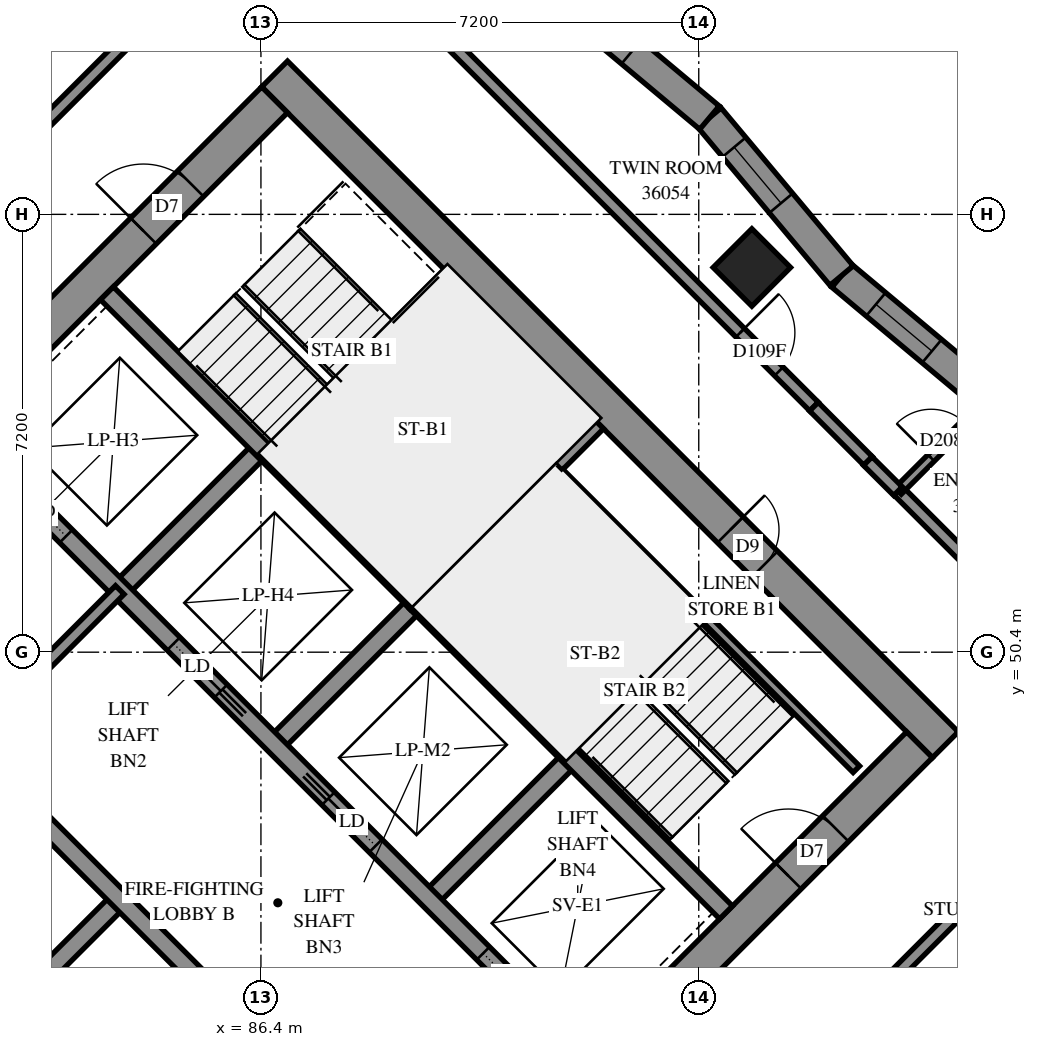
"""IFC4 building model, lengths in metres.
Left out: names, types, materials, properties, quantities, classifications, styles, units other than length and angle.
Written with IfcOpenShell. Run it as: python <this file> out.ifc"""

import sys

from ifc_helpers import new_model, si_unit, direction, frame, frame_2d, origin, origin_2d, place, context, subcontext, project, spatial, polyline, rectangle, outline, extrude, element, fill, save


model = new_model("IFC4")
c1 = context("Model", 3, precision=1e-05, world=origin(), true_north=direction((0.0, 1.0)))
c2 = subcontext(c1, "Body", "Model", "MODEL_VIEW")
j1 = project(units=[si_unit("LENGTHUNIT", "METRE"), si_unit("PLANEANGLEUNIT", "RADIAN")], contexts=[c1])
p1 = place(None, origin())
s1 = spatial("IfcSite", under=j1, at=p1, CompositionType="ELEMENT")
p2 = place(p1, origin())
s2 = spatial("IfcBuilding", under=s1, at=p2, CompositionType="ELEMENT")
p3 = place(p2, frame((0.0, 0.0, 135.4)))
s3 = spatial("IfcBuildingStorey", under=s2, at=p3, CompositionType="ELEMENT", Elevation=135.4)
p4 = place(p3, frame((94.474, 56.727, 0.0), z_axis=(0.0, 0.0, 1.0), x_axis=(0.7071067812, -0.7071067812, 0.0)))
e1 = element("IfcColumn", 1, at=p4, inside=s3, PredefinedType="COLUMN", context=c2, shape_type="SweptSolid", body=[
    extrude(rectangle(XDim=0.9, YDim=0.9, at=origin_2d()), origin(), (0.0, 0.0, 1.0), 3.1),
])
p5 = place(p3, frame((76.018, 49.302, -0.3), z_axis=(0.0, 0.0, 1.0), x_axis=(0.7071067812, -0.7071067812, 0.0)))
e2 = element("IfcWall", 2, at=p5, inside=s3, PredefinedType="SHEAR", context=c2, shape_type="SweptSolid", body=[
    extrude(rectangle(XDim=15.6, YDim=0.6, at=frame_2d((7.8, 0.0))), origin(), (0.0, 0.0, 1.0), 2.7),
])
p6 = place(p3, frame((86.625, 59.908, -0.3), z_axis=(0.0, 0.0, 1.0), x_axis=(0.7071067812, -0.7071067812, 0.0)))
e3 = element("IfcWall", 3, at=p6, inside=s3, PredefinedType="SHEAR", context=c2, shape_type="SweptSolid", body=[
    extrude(rectangle(XDim=15.6, YDim=0.6, at=frame_2d((7.8, 0.0))), origin(), (0.0, 0.0, 1.0), 2.7),
])
p7 = place(p6, frame((10.6, 0.0, 0.3)))
e4 = element("IfcOpeningElement", 4, at=p7, cuts=e3, PredefinedType="OPENING", context=c2, shape_type="SweptSolid", body=[
    extrude(rectangle(XDim=0.8, YDim=2.1, at=frame_2d((0.4, 1.05))), frame((0.0, 0.31, 0.0), z_axis=(0.0, -1.0, 0.0), x_axis=(1.0, 0.0, 0.0)), (0.0, 0.0, 1.0), 0.62),
])
p8 = place(p3, frame((76.442, 49.302, -0.3), z_axis=(0.0, 0.0, 1.0), x_axis=(0.7071067812, 0.7071067812, 0.0)))
e5 = element("IfcWall", 5, at=p8, inside=s3, PredefinedType="SHEAR", context=c2, shape_type="SweptSolid", body=[
    extrude(rectangle(XDim=14.4, YDim=0.6, at=frame_2d((7.2, 0.0))), origin(), (0.0, 0.0, 1.0), 2.7),
])
p9 = place(p8, frame((4.55, 0.0, 0.3)))
e6 = element("IfcOpeningElement", 6, at=p9, cuts=e5, PredefinedType="OPENING", context=c2, shape_type="SweptSolid", body=[
    extrude(rectangle(XDim=1.1, YDim=2.1, at=frame_2d((0.55, 1.05))), frame((0.0, 0.31, 0.0), z_axis=(0.0, -1.0, 0.0), x_axis=(1.0, 0.0, 0.0)), (0.0, 0.0, 1.0), 0.62),
])
p10 = place(p8, frame((11.35, 0.0, 0.3)))
e7 = element("IfcOpeningElement", 7, at=p10, cuts=e5, PredefinedType="OPENING", context=c2, shape_type="SweptSolid", body=[
    extrude(rectangle(XDim=1.1, YDim=2.1, at=frame_2d((0.55, 1.05))), frame((0.0, 0.31, 0.0), z_axis=(0.0, -1.0, 0.0), x_axis=(1.0, 0.0, 0.0)), (0.0, 0.0, 1.0), 0.62),
])
p11 = place(p3, frame((87.049, 38.695, -0.3), z_axis=(0.0, 0.0, 1.0), x_axis=(0.7071067812, 0.7071067812, 0.0)))
e8 = element("IfcWall", 8, at=p11, inside=s3, PredefinedType="SHEAR", context=c2, shape_type="SweptSolid", body=[
    extrude(rectangle(XDim=14.4, YDim=0.6, at=frame_2d((7.2, 0.0))), origin(), (0.0, 0.0, 1.0), 2.7),
])
p12 = place(p11, frame((4.55, 0.0, 0.3)))
e9 = element("IfcOpeningElement", 9, at=p12, cuts=e8, PredefinedType="OPENING", context=c2, shape_type="SweptSolid", body=[
    extrude(rectangle(XDim=1.1, YDim=2.1, at=frame_2d((0.55, 1.05))), frame((0.0, 0.31, 0.0), z_axis=(0.0, -1.0, 0.0), x_axis=(1.0, 0.0, 0.0)), (0.0, 0.0, 1.0), 0.62),
])
p13 = place(p11, frame((11.35, 0.0, 0.3)))
e10 = element("IfcOpeningElement", 10, at=p13, cuts=e8, PredefinedType="OPENING", context=c2, shape_type="SweptSolid", body=[
    extrude(rectangle(XDim=1.1, YDim=2.1, at=frame_2d((0.55, 1.05))), frame((0.0, 0.31, 0.0), z_axis=(0.0, -1.0, 0.0), x_axis=(1.0, 0.0, 0.0)), (0.0, 0.0, 1.0), 0.62),
])
p14 = place(p3, frame((84.079, 51.423, 0.0), z_axis=(0.0, 0.0, 1.0), x_axis=(0.7071219326, 0.7070916295, 0.0)))
e11 = element("IfcWall", 11, at=p14, inside=s3, PredefinedType="SOLIDWALL", context=c2, shape_type="SweptSolid", body=[
    extrude(rectangle(XDim=3.3, YDim=0.3, at=frame_2d((1.65, 0.0))), origin(), (0.0, 0.0, 1.0), 3.1),
])
p15 = place(p3, frame((81.746, 43.999, 0.0), z_axis=(0.0, 0.0, 1.0), x_axis=(0.7071067812, 0.7071067812, 0.0)))
e12 = element("IfcWall", 12, at=p15, inside=s3, PredefinedType="SOLIDWALL", context=c2, shape_type="SweptSolid", body=[
    extrude(rectangle(XDim=3.3, YDim=0.3, at=frame_2d((1.65, 0.0))), origin(), (0.0, 0.0, 1.0), 3.1),
])
for number, where, z_axis, x_axis in (
    (13, (86.625, 48.878, 0.0), (0.0, 0.0, 1.0), (0.707, 0.707, 0.0)),
    (14, (89.17, 46.332, 0.0), (0.0, 0.0, 1.0), (0.707, 0.707, 0.0)),
):
    element("IfcWall", number, at=place(p3, frame(where, z_axis=z_axis, x_axis=x_axis)), inside=s3, PredefinedType="SOLIDWALL", context=c2, shape_type="SweptSolid", body=[
        extrude(rectangle(XDim=3.3, YDim=0.3, at=frame_2d((1.65, 0.0))), origin(), (0.0, 0.0, 1.0), 3.1),
    ])
p16 = place(p3, frame((78.988, 51.423, 0.0), z_axis=(0.0, 0.0, 1.0), x_axis=(0.7071067812, -0.7071067812, 0.0)))
e15 = element("IfcWall", 15, at=p16, inside=s3, PredefinedType="SOLIDWALL", context=c2, shape_type="SweptSolid", body=[
    extrude(rectangle(XDim=14.4, YDim=0.3, at=frame_2d((7.2, 0.0))), origin(), (0.0, 0.0, 1.0), 3.1),
])
p17 = place(p16, frame((12.05, 0.0, 0.0)))
e16 = element("IfcOpeningElement", 16, at=p17, cuts=e15, PredefinedType="OPENING", context=c2, shape_type="SweptSolid", body=[
    extrude(rectangle(XDim=1.1, YDim=2.1, at=frame_2d((0.55, 1.05))), frame((0.0, 0.16, 0.0), z_axis=(0.0, -1.0, 0.0), x_axis=(1.0, 0.0, 0.0)), (0.0, 0.0, 1.0), 0.32),
])
p18 = place(p3, frame((81.534, 53.969, 0.0), z_axis=(0.0, 0.0, 1.0), x_axis=(0.707103309, -0.7071102534, 0.0)))
e17 = element("IfcWall", 17, at=p18, inside=s3, PredefinedType="SOLIDWALL", context=c2, shape_type="SweptSolid", body=[
    extrude(rectangle(XDim=14.4, YDim=0.3, at=frame_2d((7.2, 0.0))), origin(), (0.0, 0.0, 1.0), 3.1),
])
p19 = place(p18, frame((1.25, 0.0, 0.0)))
e18 = element("IfcOpeningElement", 18, at=p19, cuts=e17, PredefinedType="OPENING", context=c2, shape_type="SweptSolid", body=[
    extrude(rectangle(XDim=1.1, YDim=2.1, at=frame_2d((0.55, 1.05))), frame((0.0, 0.16, 0.0), z_axis=(0.0, -1.0, 0.0), x_axis=(1.0, 0.0, 0.0)), (0.0, 0.0, 1.0), 0.32),
])
p20 = place(p18, frame((4.85, 0.0, 0.0)))
e19 = element("IfcOpeningElement", 19, at=p20, cuts=e17, PredefinedType="OPENING", context=c2, shape_type="SweptSolid", body=[
    extrude(rectangle(XDim=1.1, YDim=2.1, at=frame_2d((0.55, 1.05))), frame((0.0, 0.16, 0.0), z_axis=(0.0, -1.0, 0.0), x_axis=(1.0, 0.0, 0.0)), (0.0, 0.0, 1.0), 0.32),
])
p21 = place(p18, frame((8.45, 0.0, 0.0)))
e20 = element("IfcOpeningElement", 20, at=p21, cuts=e17, PredefinedType="OPENING", context=c2, shape_type="SweptSolid", body=[
    extrude(rectangle(XDim=1.1, YDim=2.1, at=frame_2d((0.55, 1.05))), frame((0.0, 0.16, 0.0), z_axis=(0.0, -1.0, 0.0), x_axis=(1.0, 0.0, 0.0)), (0.0, 0.0, 1.0), 0.32),
])
p22 = place(p18, frame((12.05, 0.0, 0.0)))
e21 = element("IfcOpeningElement", 21, at=p22, cuts=e17, PredefinedType="OPENING", context=c2, shape_type="SweptSolid", body=[
    extrude(rectangle(XDim=1.1, YDim=2.1, at=frame_2d((0.55, 1.05))), frame((0.0, 0.16, 0.0), z_axis=(0.0, -1.0, 0.0), x_axis=(1.0, 0.0, 0.0)), (0.0, 0.0, 1.0), 0.32),
])
for number, where, z_axis, x_axis in (
    (22, (83.867, 56.302, 0.0), (0.0, 0.0, 1.0), (0.707, -0.707, 0.0)),
    (23, (88.958, 51.211, 0.0), (0.0, 0.0, 1.0), (0.707, -0.707, 0.0)),
):
    element("IfcWall", number, at=place(p3, frame(where, z_axis=z_axis, x_axis=x_axis)), inside=s3, PredefinedType="SOLIDWALL", context=c2, shape_type="SweptSolid", body=[
        extrude(rectangle(XDim=7.2, YDim=0.3, at=frame_2d((3.6, 0.0))), origin(), (0.0, 0.0, 1.0), 3.1),
    ])
p23 = place(p3, frame((88.958, 51.211, 0.0), z_axis=(0.0, 0.0, 1.0), x_axis=(0.7071067812, 0.7071067812, 0.0)))
e24 = element("IfcWall", 24, at=p23, inside=s3, PredefinedType="SOLIDWALL", context=c2, shape_type="SweptSolid", body=[
    extrude(rectangle(XDim=4.2, YDim=0.3, at=frame_2d((2.1, 0.0))), origin(), (0.0, 0.0, 1.0), 3.1),
])
p24 = place(p3, frame((98.546, 54.421, 0.0), z_axis=(0.0, 0.0, 1.0), x_axis=(-0.7669706225, 0.6416822144, 0.0)))
e25 = element("IfcWall", 25, at=p24, inside=s3, PredefinedType="SOLIDWALL", context=c2, shape_type="SweptSolid", body=[
    extrude(outline(polyline([(-0.022, -0.25), (3.364, -0.25), (3.408, 0.25), (0.022, 0.25), (-0.022, -0.25)])), origin(), (0.0, 0.0, 1.0), 3.1),
])
p25 = place(p24, frame((1.45, 0.0, 0.45)))
e26 = element("IfcOpeningElement", 26, at=p25, cuts=e25, PredefinedType="OPENING", context=c2, shape_type="SweptSolid", body=[
    extrude(rectangle(XDim=1.2, YDim=2.5, at=frame_2d((0.6, 1.25))), frame((0.0, 0.26, 0.0), z_axis=(0.0, -1.0, 0.0), x_axis=(1.0, 0.0, 0.0)), (0.0, 0.0, 1.0), 0.52),
])
p26 = place(p3, frame((95.949, 56.593, 0.0), z_axis=(0.0, 0.0, 1.0), x_axis=(-0.6416822144, 0.7669706225, 0.0)))
e27 = element("IfcWall", 27, at=p26, inside=s3, PredefinedType="SOLIDWALL", context=c2, shape_type="SweptSolid", body=[
    extrude(outline(polyline([(0.022, -0.25), (3.408, -0.25), (3.364, 0.25), (-0.022, 0.25), (0.022, -0.25)])), origin(), (0.0, 0.0, 1.0), 3.1),
])
p27 = place(p26, frame((1.553, 0.0, 0.45)))
e28 = element("IfcOpeningElement", 28, at=p27, cuts=e27, PredefinedType="OPENING", context=c2, shape_type="SweptSolid", body=[
    extrude(rectangle(XDim=1.2, YDim=2.5, at=frame_2d((0.6, 1.25))), frame((0.0, 0.26, 0.0), z_axis=(0.0, -1.0, 0.0), x_axis=(1.0, 0.0, 0.0)), (0.0, 0.0, 1.0), 0.52),
])
p28 = place(p3, frame((93.776, 59.19, 0.0), z_axis=(0.0, 0.0, 1.0), x_axis=(-0.7669706225, 0.6416822144, 0.0)))
e29 = element("IfcWall", 29, at=p28, inside=s3, PredefinedType="SOLIDWALL", context=c2, shape_type="SweptSolid", body=[
    extrude(outline(polyline([(-0.022, -0.25), (3.364, -0.25), (3.408, 0.25), (0.022, 0.25), (-0.022, -0.25)])), origin(), (0.0, 0.0, 1.0), 3.1),
])
p29 = place(p28, frame((1.678, 0.0, 0.45)))
e30 = element("IfcOpeningElement", 30, at=p29, cuts=e29, PredefinedType="OPENING", context=c2, shape_type="SweptSolid", body=[
    extrude(rectangle(XDim=1.2, YDim=2.5, at=frame_2d((0.6, 1.25))), frame((0.0, 0.26, 0.0), z_axis=(0.0, -1.0, 0.0), x_axis=(1.0, 0.0, 0.0)), (0.0, 0.0, 1.0), 0.52),
])
p30 = place(p3, frame((91.313, 53.354, 0.0), z_axis=(0.0, 0.0, 1.0), x_axis=(0.7071140275, -0.7070995348, 0.0)))
e31 = element("IfcWall", 31, at=p30, inside=s3, PredefinedType="PARTITIONING", context=c2, shape_type="SweptSolid", body=[
    extrude(rectangle(XDim=6.9, YDim=0.15, at=frame_2d((3.45, 0.0))), origin(), (0.0, 0.0, 1.0), 3.1),
])
p31 = place(p3, frame((81.534, 48.878, 0.0), z_axis=(0.0, 0.0, 1.0), x_axis=(0.707092892, 0.7071206701, 0.0)))
e32 = element("IfcWall", 32, at=p31, inside=s3, PredefinedType="PARTITIONING", context=c2, shape_type="SweptSolid", body=[
    extrude(rectangle(XDim=3.6, YDim=0.2, at=frame_2d((1.8, 0.0))), origin(), (0.0, 0.0, 1.0), 3.1),
])
p32 = place(p3, frame((88.326, 61.609, 0.0), z_axis=(0.0, 0.0, 1.0), x_axis=(0.7071067812, -0.7071067812, 0.0)))
e33 = element("IfcWall", 33, at=p32, inside=s3, PredefinedType="PARTITIONING", context=c2, shape_type="SweptSolid", body=[
    extrude(rectangle(XDim=10.14, YDim=0.2, at=frame_2d((5.07, 0.0))), origin(), (0.0, 0.0, 1.0), 3.1),
])
p33 = place(p32, frame((8.422, 0.0, 0.0)))
e34 = element("IfcOpeningElement", 34, at=p33, cuts=e33, PredefinedType="OPENING", context=c2, shape_type="SweptSolid", body=[
    extrude(rectangle(XDim=0.9, YDim=2.1, at=frame_2d((0.45, 1.05))), frame((0.0, 0.11, 0.0), z_axis=(0.0, -1.0, 0.0), x_axis=(1.0, 0.0, 0.0)), (0.0, 0.0, 1.0), 0.22),
])
p34 = place(p3, frame((80.899, 58.427, 0.0), z_axis=(0.0, 0.0, 1.0), x_axis=(0.707112197, 0.7071013653, 0.0)))
e35 = element("IfcWall", 35, at=p34, inside=s3, PredefinedType="PARTITIONING", context=c2, shape_type="SweptSolid", body=[
    extrude(rectangle(XDim=9.232, YDim=0.2, at=frame_2d((4.616, 0.0))), origin(), (0.0, 0.0, 1.0), 3.1),
])
p35 = place(p3, frame((94.543, 42.797, 0.0), z_axis=(0.0, 0.0, 1.0), x_axis=(0.7071067812, 0.7071067812, 0.0)))
e36 = element("IfcWall", 36, at=p35, inside=s3, PredefinedType="PARTITIONING", context=c2, shape_type="SweptSolid", body=[
    extrude(rectangle(XDim=8.901, YDim=0.2, at=frame_2d((4.45, 0.0))), origin(), (0.0, 0.0, 1.0), 3.1),
])
p36 = place(p35, frame((0.193, 0.0, 0.0)))
e37 = element("IfcOpeningElement", 37, at=p36, cuts=e36, PredefinedType="OPENING", context=c2, shape_type="SweptSolid", body=[
    extrude(rectangle(XDim=1.0, YDim=2.1, at=frame_2d((0.5, 1.05))), frame((0.0, 0.11, 0.0), z_axis=(0.0, -1.0, 0.0), x_axis=(1.0, 0.0, 0.0)), (0.0, 0.0, 1.0), 0.22),
])
p37 = place(p3, frame((80.901, 57.157, 0.0), z_axis=(0.0, 0.0, 1.0), x_axis=(0.7071067812, 0.7071067812, 0.0)))
e38 = element("IfcWall", 38, at=p37, inside=s3, PredefinedType="PARTITIONING", context=c2, shape_type="SweptSolid", body=[
    extrude(rectangle(XDim=8.392, YDim=0.2, at=frame_2d((4.196, 0.0))), origin(), (0.0, 0.0, 1.0), 3.1),
])
p38 = place(p3, frame((96.875, 43.861, 0.0), z_axis=(0.0, 0.0, 1.0), x_axis=(0.7072324205, 0.7069811196, 0.0)))
e39 = element("IfcWall", 39, at=p38, inside=s3, PredefinedType="PARTITIONING", context=c2, shape_type="SweptSolid", body=[
    extrude(rectangle(XDim=8.357, YDim=0.2, at=frame_2d((4.178, 0.0))), origin(), (0.0, 0.0, 1.0), 3.1),
])
p39 = place(p3, frame((96.882, 53.053, 0.0), z_axis=(0.0, 0.0, 1.0), x_axis=(0.7071067812, -0.7071067812, 0.0)))
e40 = element("IfcWall", 40, at=p39, inside=s3, PredefinedType="PARTITIONING", context=c2, shape_type="SweptSolid", body=[
    extrude(rectangle(XDim=1.901, YDim=0.2, at=frame_2d((0.95, 0.0))), origin(), (0.0, 0.0, 1.0), 3.1),
])
p40 = place(p3, frame((96.877, 53.051, 0.0), z_axis=(0.0, 0.0, 1.0), x_axis=(0.7071333947, 0.7070801667, 0.0)))
e41 = element("IfcWall", 41, at=p40, inside=s3, PredefinedType="PARTITIONING", context=c2, shape_type="SweptSolid", body=[
    extrude(rectangle(XDim=1.879, YDim=0.15, at=frame_2d((0.939, 0.0))), origin(), (0.0, 0.0, 1.0), 3.1),
])
p41 = place(p40, frame((0.77, 0.0, 0.0)))
e42 = element("IfcOpeningElement", 42, at=p41, cuts=e41, PredefinedType="OPENING", context=c2, shape_type="SweptSolid", body=[
    extrude(rectangle(XDim=0.8, YDim=2.1, at=frame_2d((0.4, 1.05))), frame((0.0, 0.085, 0.0), z_axis=(0.0, -1.0, 0.0), x_axis=(1.0, 0.0, 0.0)), (0.0, 0.0, 1.0), 0.17),
])
p42 = place(p3, frame((95.494, 54.438, 0.0), z_axis=(0.0, 0.0, 1.0), x_axis=(0.706312726, -0.7078999456, 0.0)))
e43 = element("IfcWall", 43, at=p42, inside=s3, PredefinedType="PARTITIONING", context=c2, shape_type="SweptSolid", body=[
    extrude(rectangle(XDim=1.26, YDim=0.2, at=frame_2d((0.63, 0.0))), origin(), (0.0, 0.0, 1.0), 3.1),
])
p43 = place(p3, frame((96.38, 53.542, 0.0), z_axis=(0.0, 0.0, 1.0), x_axis=(0.7085338339, -0.7056768426, 0.0)))
e44 = element("IfcWall", 44, at=p43, inside=s3, PredefinedType="PARTITIONING", context=c2, shape_type="SweptSolid", body=[
    extrude(rectangle(XDim=0.7, YDim=0.2, at=frame_2d((0.35, 0.0))), origin(), (0.0, 0.0, 1.0), 3.1),
])
p44 = place(p25, origin())
e45 = element("IfcWindow", 45, at=p44, inside=s3, PartitioningType="SINGLE_PANEL", PredefinedType="WINDOW", context=c2, shape_type="SweptSolid", body=[
    extrude(rectangle(XDim=1.2, YDim=2.5, at=frame_2d((0.6, 1.25))), frame((0.0, 0.18, 0.0), z_axis=(0.0, -1.0, 0.0), x_axis=(1.0, 0.0, 0.0)), (0.0, 0.0, 1.0), 0.06),
])
fill(e26, e45)
p45 = place(p27, origin())
e46 = element("IfcWindow", 46, at=p45, inside=s3, PartitioningType="SINGLE_PANEL", PredefinedType="WINDOW", context=c2, shape_type="SweptSolid", body=[
    extrude(rectangle(XDim=1.2, YDim=2.5, at=frame_2d((0.6, 1.25))), frame((0.0, 0.18, 0.0), z_axis=(0.0, -1.0, 0.0), x_axis=(1.0, 0.0, 0.0)), (0.0, 0.0, 1.0), 0.06),
])
fill(e28, e46)
p46 = place(p29, origin())
e47 = element("IfcWindow", 47, at=p46, inside=s3, PartitioningType="SINGLE_PANEL", PredefinedType="WINDOW", context=c2, shape_type="SweptSolid", body=[
    extrude(rectangle(XDim=1.2, YDim=2.5, at=frame_2d((0.6, 1.25))), frame((0.0, 0.18, 0.0), z_axis=(0.0, -1.0, 0.0), x_axis=(1.0, 0.0, 0.0)), (0.0, 0.0, 1.0), 0.06),
])
fill(e30, e47)
p47 = place(p7, origin())
e48 = element("IfcDoor", 48, at=p47, inside=s3, OperationType="SINGLE_SWING_RIGHT", PredefinedType="DOOR", context=c2, shape_type="SweptSolid", body=[
    extrude(rectangle(XDim=0.8, YDim=2.1, at=frame_2d((0.4, 1.05))), frame((0.0, 0.025, 0.0), z_axis=(0.0, -1.0, 0.0), x_axis=(1.0, 0.0, 0.0)), (0.0, 0.0, 1.0), 0.05),
])
fill(e4, e48)
p48 = place(p10, origin())
e49 = element("IfcDoor", 49, at=p48, inside=s3, OperationType="SINGLE_SWING_LEFT", PredefinedType="DOOR", context=c2, shape_type="SweptSolid", body=[
    extrude(rectangle(XDim=1.1, YDim=2.1, at=frame_2d((0.55, 1.05))), frame((0.0, 0.025, 0.0), z_axis=(0.0, -1.0, 0.0), x_axis=(1.0, 0.0, 0.0)), (0.0, 0.0, 1.0), 0.05),
])
fill(e7, e49)
p49 = place(p13, origin())
e50 = element("IfcDoor", 50, at=p49, inside=s3, OperationType="SINGLE_SWING_RIGHT", PredefinedType="DOOR", context=c2, shape_type="SweptSolid", body=[
    extrude(rectangle(XDim=1.1, YDim=2.1, at=frame_2d((0.55, 1.05))), frame((0.0, 0.025, 0.0), z_axis=(0.0, -1.0, 0.0), x_axis=(1.0, 0.0, 0.0)), (0.0, 0.0, 1.0), 0.05),
])
fill(e10, e50)
p50 = place(p19, origin())
e51 = element("IfcDoor", 51, at=p50, inside=s3, OperationType="SLIDING_TO_LEFT", PredefinedType="DOOR", context=c2, shape_type="SweptSolid", body=[
    extrude(rectangle(XDim=1.1, YDim=2.1, at=frame_2d((0.55, 1.05))), frame((0.0, 0.025, 0.0), z_axis=(0.0, -1.0, 0.0), x_axis=(1.0, 0.0, 0.0)), (0.0, 0.0, 1.0), 0.05),
])
fill(e18, e51)
p51 = place(p20, origin())
e52 = element("IfcDoor", 52, at=p51, inside=s3, OperationType="SLIDING_TO_RIGHT", PredefinedType="DOOR", context=c2, shape_type="SweptSolid", body=[
    extrude(rectangle(XDim=1.1, YDim=2.1, at=frame_2d((0.55, 1.05))), frame((0.0, 0.025, 0.0), z_axis=(0.0, -1.0, 0.0), x_axis=(1.0, 0.0, 0.0)), (0.0, 0.0, 1.0), 0.05),
])
fill(e19, e52)
p52 = place(p21, origin())
e53 = element("IfcDoor", 53, at=p52, inside=s3, OperationType="SLIDING_TO_LEFT", PredefinedType="DOOR", context=c2, shape_type="SweptSolid", body=[
    extrude(rectangle(XDim=1.1, YDim=2.1, at=frame_2d((0.55, 1.05))), frame((0.0, 0.025, 0.0), z_axis=(0.0, -1.0, 0.0), x_axis=(1.0, 0.0, 0.0)), (0.0, 0.0, 1.0), 0.05),
])
fill(e20, e53)
p53 = place(p22, origin())
e54 = element("IfcDoor", 54, at=p53, inside=s3, OperationType="SLIDING_TO_RIGHT", PredefinedType="DOOR", context=c2, shape_type="SweptSolid", body=[
    extrude(rectangle(XDim=1.1, YDim=2.1, at=frame_2d((0.55, 1.05))), frame((0.0, 0.025, 0.0), z_axis=(0.0, -1.0, 0.0), x_axis=(1.0, 0.0, 0.0)), (0.0, 0.0, 1.0), 0.05),
])
fill(e21, e54)
p54 = place(p33, origin())
e55 = element("IfcDoor", 55, at=p54, inside=s3, OperationType="SINGLE_SWING_LEFT", PredefinedType="DOOR", context=c2, shape_type="SweptSolid", body=[
    extrude(rectangle(XDim=0.9, YDim=2.1, at=frame_2d((0.45, 1.05))), frame((0.0, 0.025, 0.0), z_axis=(0.0, -1.0, 0.0), x_axis=(1.0, 0.0, 0.0)), (0.0, 0.0, 1.0), 0.05),
])
fill(e34, e55)
p55 = place(p41, origin())
e56 = element("IfcDoor", 56, at=p55, inside=s3, OperationType="SINGLE_SWING_RIGHT", PredefinedType="DOOR", context=c2, shape_type="SweptSolid", body=[
    extrude(rectangle(XDim=0.8, YDim=2.1, at=frame_2d((0.4, 1.05))), frame((0.0, 0.025, 0.0), z_axis=(0.0, -1.0, 0.0), x_axis=(1.0, 0.0, 0.0)), (0.0, 0.0, 1.0), 0.05),
])
fill(e42, e56)
save(model, sys.argv[1])
